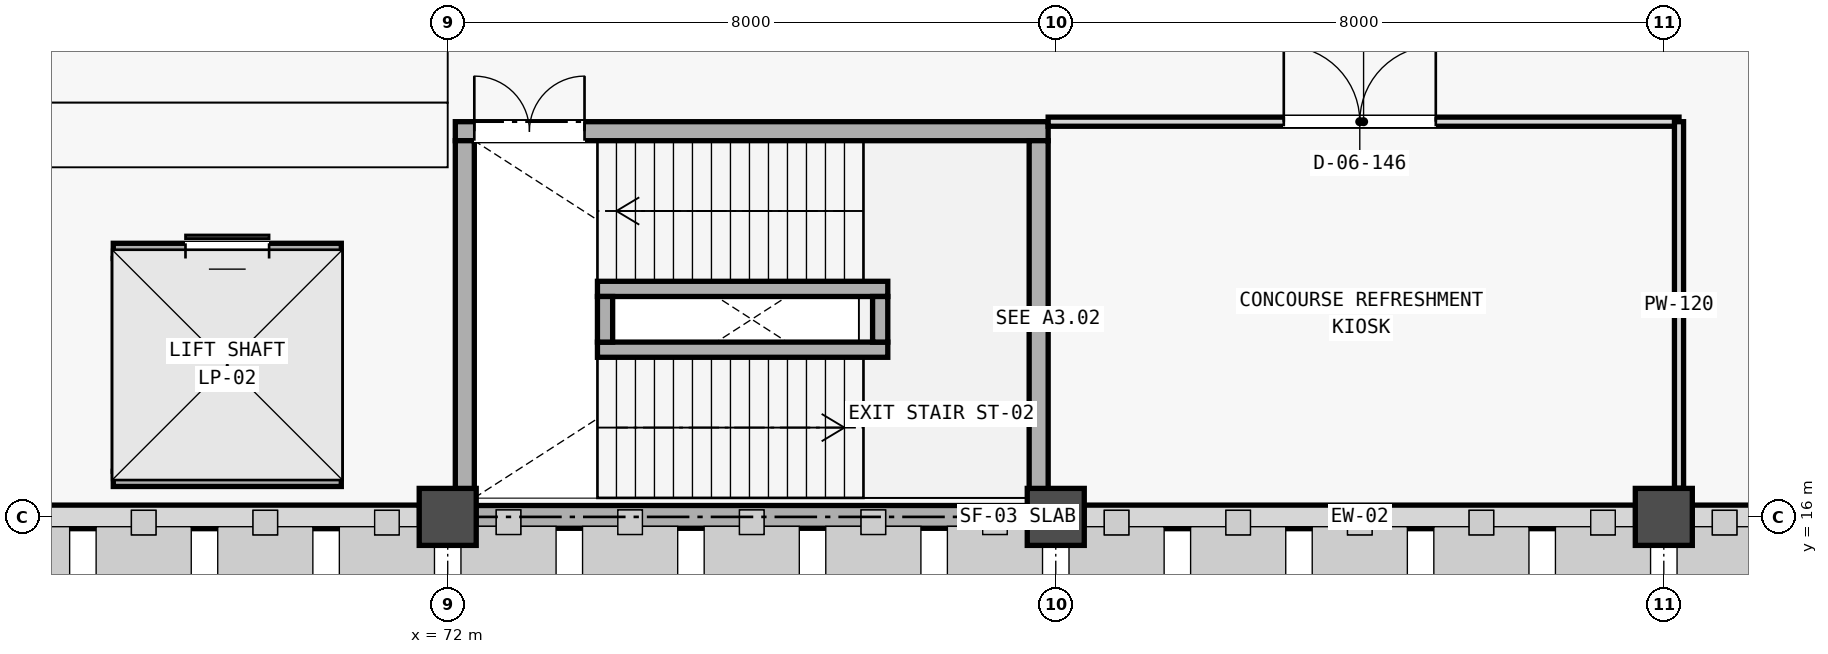
"""IFC4 building model, lengths in metres.
Left out: names, types, materials, properties, quantities, classifications, styles, units other than length and angle.
Written with IfcOpenShell. Run it as: python <this file> out.ifc"""

import sys

from ifc_helpers import new_model, si_unit, direction, frame, frame_2d, origin, origin_2d, place, context, subcontext, project, spatial, rectangle, extrude, element, fill, save


model = new_model("IFC4")
c1 = context("Model", 3, precision=1e-05, world=origin(), true_north=direction((0.0, 1.0)))
c2 = subcontext(c1, "Body", "Model", "MODEL_VIEW")
j1 = project(units=[si_unit("LENGTHUNIT", "METRE"), si_unit("PLANEANGLEUNIT", "RADIAN")], contexts=[c1])
p1 = place(None, origin())
s1 = spatial("IfcSite", under=j1, at=p1, CompositionType="ELEMENT")
p2 = place(p1, origin())
s2 = spatial("IfcBuilding", under=s1, at=p2, CompositionType="ELEMENT")
p3 = place(p2, frame((0.0, 0.0, 5.4)))
s3 = spatial("IfcBuildingStorey", under=s2, at=p3, CompositionType="ELEMENT", Elevation=5.4)
for number, where, z_axis, x_axis in (
    (1, (72.0, 16.0, 0.0), (0.0, 0.0, 1.0), (1.0, 0.0, 0.0)),
    (2, (80.0, 16.0, 0.0), (0.0, 0.0, 1.0), (1.0, 0.0, 0.0)),
    (3, (88.0, 16.0, 0.0), (0.0, 0.0, 1.0), (1.0, 0.0, 0.0)),
):
    element("IfcColumn", number, at=place(p3, frame(where, z_axis=z_axis, x_axis=x_axis)), inside=s3, PredefinedType="COLUMN", context=c2, shape_type="SweptSolid", body=[
        extrude(rectangle(XDim=0.75, YDim=0.75, at=origin_2d()), origin(), (0.0, 0.0, 1.0), 4.55),
    ])
p4 = place(p3, frame((64.371, 16.0, 0.0), z_axis=(0.0, 0.0, 1.0), x_axis=(1.0, 0.0, 0.0)))
e4 = element("IfcWall", 4, at=p4, inside=s3, PredefinedType="STANDARD", context=c2, shape_type="SweptSolid", body=[
    extrude(rectangle(XDim=7.258, YDim=0.31, at=frame_2d((3.629, 0.0))), origin(), (0.0, 0.0, 1.0), 3.73),
])
p5 = place(p3, frame((72.371, 16.0, 0.0), z_axis=(0.0, 0.0, 1.0), x_axis=(1.0, 0.0, 0.0)))
e5 = element("IfcWall", 5, at=p5, inside=s3, PredefinedType="SHEAR", context=c2, shape_type="SweptSolid", body=[
    extrude(rectangle(XDim=7.258, YDim=0.3, at=frame_2d((3.629, 0.0))), origin(), (0.0, 0.0, 1.0), 4.8),
])
for number, where, z_axis, x_axis in (
    (6, (80.371, 16.0, 0.0), (0.0, 0.0, 1.0), (1.0, 0.0, 0.0)),
    (7, (88.371, 16.0, 0.0), (0.0, 0.0, 1.0), (1.0, 0.0, 0.0)),
):
    element("IfcWall", number, at=place(p3, frame(where, z_axis=z_axis, x_axis=x_axis)), inside=s3, PredefinedType="STANDARD", context=c2, shape_type="SweptSolid", body=[
        extrude(rectangle(XDim=7.258, YDim=0.31, at=frame_2d((3.629, 0.0))), origin(), (0.0, 0.0, 1.0), 3.73),
    ])
p6 = place(p3, frame((72.1, 21.075, 0.0), z_axis=(0.0, 0.0, 1.0), x_axis=(1.0, 0.0, 0.0)))
e8 = element("IfcWall", 8, at=p6, inside=s3, PredefinedType="SHEAR", context=c2, shape_type="SweptSolid", body=[
    extrude(rectangle(XDim=7.8, YDim=0.25, at=frame_2d((3.9, 0.0))), origin(), (0.0, 0.0, 1.0), 4.8),
])
p7 = place(p6, frame((0.25, 0.0, 0.0)))
e9 = element("IfcOpeningElement", 9, at=p7, cuts=e8, PredefinedType="OPENING", context=c2, shape_type="SweptSolid", body=[
    extrude(rectangle(XDim=1.45, YDim=2.2, at=frame_2d((0.725, 1.1))), frame((0.0, 0.135, 0.0), z_axis=(0.0, -1.0, 0.0), x_axis=(1.0, 0.0, 0.0)), (0.0, 0.0, 1.0), 0.27),
])
for number, where, z_axis, x_axis in (
    (10, (72.225, 16.25, 0.0), (0.0, 0.0, 1.0), (0.0, 1.0, 0.0)),
    (11, (79.775, 16.25, 0.0), (0.0, 0.0, 1.0), (0.0, 1.0, 0.0)),
):
    element("IfcWall", number, at=place(p3, frame(where, z_axis=z_axis, x_axis=x_axis)), inside=s3, PredefinedType="SHEAR", context=c2, shape_type="SweptSolid", body=[
        extrude(rectangle(XDim=4.7, YDim=0.25, at=frame_2d((2.35, 0.0))), origin(), (0.0, 0.0, 1.0), 4.8),
    ])
for number, where, z_axis, x_axis in (
    (12, (73.97, 18.2, 0.0), (0.0, 0.0, 1.0), (1.0, 0.0, 0.0)),
    (13, (73.97, 19.0, 0.0), (0.0, 0.0, 1.0), (1.0, 0.0, 0.0)),
):
    element("IfcWall", number, at=place(p3, frame(where, z_axis=z_axis, x_axis=x_axis)), inside=s3, PredefinedType="SHEAR", context=c2, shape_type="SweptSolid", body=[
        extrude(rectangle(XDim=3.82, YDim=0.2, at=frame_2d((1.91, 0.0))), origin(), (0.0, 0.0, 1.0), 4.8),
    ])
for number, where, z_axis, x_axis in (
    (14, (74.07, 18.3, 0.0), (0.0, 0.0, 1.0), (0.0, 1.0, 0.0)),
    (15, (77.69, 18.3, 0.0), (0.0, 0.0, 1.0), (0.0, 1.0, 0.0)),
):
    element("IfcWall", number, at=place(p3, frame(where, z_axis=z_axis, x_axis=x_axis)), inside=s3, PredefinedType="SHEAR", context=c2, shape_type="SweptSolid", body=[
        extrude(rectangle(XDim=0.6, YDim=0.2, at=frame_2d((0.3, 0.0))), origin(), (0.0, 0.0, 1.0), 4.8),
    ])
p8 = place(p3, frame((67.6, 16.5, 0.0), z_axis=(0.0, 0.0, 1.0), x_axis=(1.0, 0.0, 0.0)))
e16 = element("IfcWall", 16, at=p8, inside=s3, PredefinedType="SHEAR", context=c2, shape_type="SweptSolid", body=[
    extrude(rectangle(XDim=3.0, YDim=0.2, at=frame_2d((1.5, 0.0))), origin(), (0.0, 0.0, 1.0), 4.8),
])
p9 = place(p3, frame((67.6, 19.5, 0.0), z_axis=(0.0, 0.0, 1.0), x_axis=(1.0, 0.0, 0.0)))
e17 = element("IfcWall", 17, at=p9, inside=s3, PredefinedType="SHEAR", context=c2, shape_type="SweptSolid", body=[
    extrude(rectangle(XDim=3.0, YDim=0.2, at=frame_2d((1.5, 0.0))), origin(), (0.0, 0.0, 1.0), 4.8),
])
p10 = place(p9, frame((0.95, 0.0, 0.0)))
e18 = element("IfcOpeningElement", 18, at=p10, cuts=e17, PredefinedType="OPENING", context=c2, shape_type="SweptSolid", body=[
    extrude(rectangle(XDim=1.1, YDim=2.2, at=frame_2d((0.55, 1.1))), frame((0.0, 0.11, 0.0), z_axis=(0.0, -1.0, 0.0), x_axis=(1.0, 0.0, 0.0)), (0.0, 0.0, 1.0), 0.22),
])
for number, where, z_axis, x_axis in (
    (19, (67.7, 16.6, 0.0), (0.0, 0.0, 1.0), (0.0, 1.0, 0.0)),
    (20, (70.5, 16.6, 0.0), (0.0, 0.0, 1.0), (0.0, 1.0, 0.0)),
):
    element("IfcWall", number, at=place(p3, frame(where, z_axis=z_axis, x_axis=x_axis)), inside=s3, PredefinedType="SHEAR", context=c2, shape_type="SweptSolid", body=[
        extrude(rectangle(XDim=2.8, YDim=0.2, at=frame_2d((1.4, 0.0))), origin(), (0.0, 0.0, 1.0), 4.8),
    ])
p11 = place(p3, frame((79.9, 21.2, 0.0), z_axis=(0.0, 0.0, 1.0), x_axis=(1.0, 0.0, 0.0)))
e21 = element("IfcWall", 21, at=p11, inside=s3, PredefinedType="PARTITIONING", context=c2, shape_type="SweptSolid", body=[
    extrude(rectangle(XDim=8.3, YDim=0.12, at=frame_2d((4.15, 0.0))), origin(), (0.0, 0.0, 1.0), 3.83),
])
p12 = place(p11, frame((3.1, 0.0, 0.0)))
e22 = element("IfcOpeningElement", 22, at=p12, cuts=e21, PredefinedType="OPENING", context=c2, shape_type="SweptSolid", body=[
    extrude(rectangle(XDim=2.0, YDim=2.4, at=frame_2d((1.0, 1.2))), frame((0.0, 0.07, 0.0), z_axis=(0.0, -1.0, 0.0), x_axis=(1.0, 0.0, 0.0)), (0.0, 0.0, 1.0), 0.14),
])
p13 = place(p3, frame((88.2, 16.377, 0.0), z_axis=(0.0, 0.0, 1.0), x_axis=(0.0, 1.0, 0.0)))
e23 = element("IfcWall", 23, at=p13, inside=s3, PredefinedType="PARTITIONING", context=c2, shape_type="SweptSolid", body=[
    extrude(rectangle(XDim=4.823, YDim=0.12, at=frame_2d((2.412, 0.0))), origin(), (0.0, 0.0, 1.0), 3.83),
])
p14 = place(p7, origin())
e24 = element("IfcDoor", 24, at=p14, inside=s3, OperationType="DOUBLE_DOOR_SINGLE_SWING", PredefinedType="DOOR", context=c2, shape_type="SweptSolid", body=[
    extrude(rectangle(XDim=1.45, YDim=2.2, at=frame_2d((0.725, 1.1))), frame((0.0, 0.025, 0.0), z_axis=(0.0, -1.0, 0.0), x_axis=(1.0, 0.0, 0.0)), (0.0, 0.0, 1.0), 0.05),
])
fill(e9, e24)
p15 = place(p10, origin())
e25 = element("IfcDoor", 25, at=p15, inside=s3, OperationType="SLIDING_TO_LEFT", PredefinedType="DOOR", context=c2, shape_type="SweptSolid", body=[
    extrude(rectangle(XDim=1.1, YDim=2.2, at=frame_2d((0.55, 1.1))), frame((0.0, 0.025, 0.0), z_axis=(0.0, -1.0, 0.0), x_axis=(1.0, 0.0, 0.0)), (0.0, 0.0, 1.0), 0.05),
])
fill(e18, e25)
p16 = place(p12, origin())
e26 = element("IfcDoor", 26, at=p16, inside=s3, OperationType="DOUBLE_DOOR_SINGLE_SWING", PredefinedType="DOOR", context=c2, shape_type="SweptSolid", body=[
    extrude(rectangle(XDim=2.0, YDim=2.4, at=frame_2d((1.0, 1.2))), frame((0.0, 0.025, 0.0), z_axis=(0.0, -1.0, 0.0), x_axis=(1.0, 0.0, 0.0)), (0.0, 0.0, 1.0), 0.05),
])
fill(e22, e26)
save(model, sys.argv[1])
